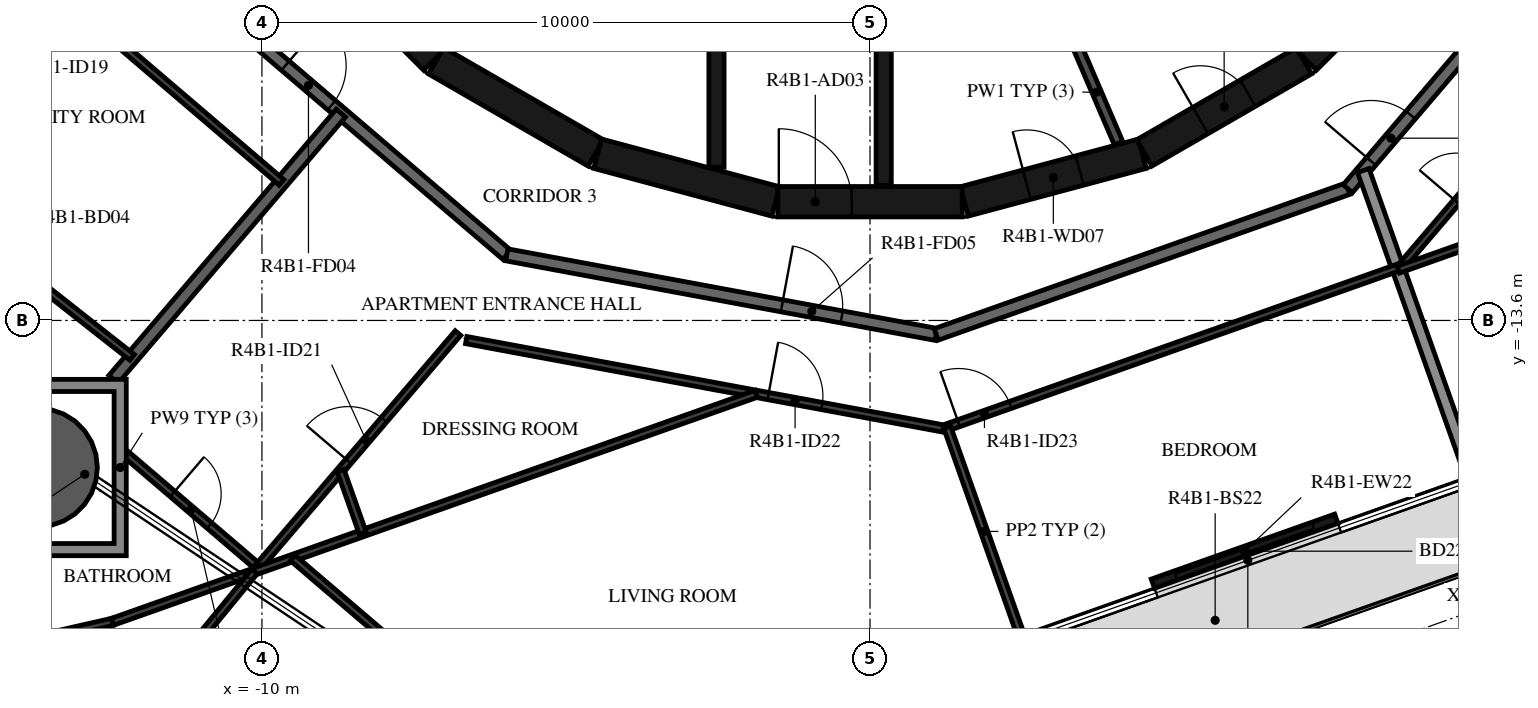
"""IFC4 building model, lengths in metres.
Left out: names, types, materials, properties, quantities, classifications, styles, units other than length and angle.
Written with IfcOpenShell. Run it as: python <this file> out.ifc"""

import sys

from ifc_helpers import new_model, si_unit, direction, frame, frame_2d, origin, origin_2d, place, context, subcontext, project, spatial, polyline, rectangle, hollow_circle, outline, extrude, element, fill, save


model = new_model("IFC4")
c1 = context("Model", 3, precision=1e-05, world=origin(), true_north=direction((0.0, 1.0)))
c2 = subcontext(c1, "Body", "Model", "MODEL_VIEW")
j1 = project(units=[si_unit("LENGTHUNIT", "METRE"), si_unit("PLANEANGLEUNIT", "RADIAN")], contexts=[c1])
p1 = place(None, origin())
s1 = spatial("IfcSite", under=j1, at=p1, CompositionType="ELEMENT")
p2 = place(p1, origin())
s2 = spatial("IfcBuilding", under=s1, at=p2, CompositionType="ELEMENT")
p3 = place(p2, frame((0.0, 0.0, 162.2)))
s3 = spatial("IfcBuildingStorey", under=s2, at=p3, CompositionType="ELEMENT", Elevation=162.2)
p4 = place(p3, frame((-13.681, -16.019, -0.38), z_axis=(0.0, 0.0, 1.0), x_axis=(1.0, 0.0, 0.0)))
e1 = element("IfcColumn", 1, at=p4, inside=s3, PredefinedType="COLUMN", context=c2, shape_type="SweptSolid", body=[
    extrude(hollow_circle(Radius=0.975, WallThickness=0.045, at=origin_2d()), origin(), (0.0, 0.0, 1.0), 3.5),
])
p5 = place(p3, frame((4.652, -17.929, 0.0), z_axis=(0.0, 0.0, 1.0), x_axis=(0.942620722428, 0.333865502335, 0.0)))
e2 = element("IfcWall", 2, at=p5, inside=s3, PredefinedType="STANDARD", context=c2, shape_type="SweptSolid", body=[
    extrude(rectangle(XDim=3.2, YDim=0.16, at=frame_2d((1.6, 0.0))), origin(), (0.0, 0.0, 1.0), 3.12),
])
p6 = place(p5, frame((0.4, 0.0, 0.0)))
e3 = element("IfcOpeningElement", 3, at=p6, cuts=e2, PredefinedType="OPENING", context=c2, shape_type="SweptSolid", body=[
    extrude(rectangle(XDim=2.4, YDim=2.4, at=frame_2d((1.2, 1.2))), frame((0.0, 0.09, 0.0), z_axis=(0.0, -1.0, 0.0), x_axis=(1.0, 0.0, 0.0)), (0.0, 0.0, 1.0), 0.18),
])
p7 = place(p3, frame((1.55, -11.643, 0.0), z_axis=(0.0, 0.0, 1.0), x_axis=(0.965948410781, 0.258734743916, 0.0)))
e4 = element("IfcWall", 4, at=p7, inside=s3, PredefinedType="SHEAR", context=c2, shape_type="SweptSolid", body=[
    extrude(rectangle(XDim=3.033, YDim=0.5, at=frame_2d((1.516, 0.0))), origin(), (0.0, 0.0, 1.0), 3.12),
])
p8 = place(p7, frame((1.066, 0.0, 0.0)))
e5 = element("IfcOpeningElement", 5, at=p8, cuts=e4, PredefinedType="OPENING", context=c2, shape_type="SweptSolid", body=[
    extrude(rectangle(XDim=0.9, YDim=2.1, at=frame_2d((0.45, 1.05))), frame((0.0, 0.26, 0.0), z_axis=(0.0, -1.0, 0.0), x_axis=(1.0, 0.0, 0.0)), (0.0, 0.0, 1.0), 0.52),
])
p9 = place(p3, frame((4.51, -10.845, 0.0), z_axis=(0.0, 0.0, 1.0), x_axis=(0.865975092491, 0.500087131594, 0.0)))
e6 = element("IfcWall", 6, at=p9, inside=s3, PredefinedType="SHEAR", context=c2, shape_type="SweptSolid", body=[
    extrude(rectangle(XDim=3.033, YDim=0.5, at=frame_2d((1.516, 0.0))), origin(), (0.0, 0.0, 1.0), 3.12),
])
p10 = place(p9, frame((1.066, 0.0, 0.0)))
e7 = element("IfcOpeningElement", 7, at=p10, cuts=e6, PredefinedType="OPENING", context=c2, shape_type="SweptSolid", body=[
    extrude(rectangle(XDim=0.9, YDim=2.1, at=frame_2d((0.45, 1.05))), frame((0.0, 0.26, 0.0), z_axis=(0.0, -1.0, 0.0), x_axis=(1.0, 0.0, 0.0)), (0.0, 0.0, 1.0), 0.52),
])
p11 = place(p3, frame((7.164, -9.308, 0.0), z_axis=(0.0, 0.0, 1.0), x_axis=(0.707106781187, 0.707106781187, 0.0)))
e8 = element("IfcWall", 8, at=p11, inside=s3, PredefinedType="SHEAR", context=c2, shape_type="SweptSolid", body=[
    extrude(rectangle(XDim=3.032, YDim=0.5, at=frame_2d((1.516, 0.0))), origin(), (0.0, 0.0, 1.0), 3.12),
])
p12 = place(p11, frame((1.566, 0.0, 0.0)))
e9 = element("IfcOpeningElement", 9, at=p12, cuts=e8, PredefinedType="OPENING", context=c2, shape_type="SweptSolid", body=[
    extrude(rectangle(XDim=0.9, YDim=2.1, at=frame_2d((0.45, 1.05))), frame((0.0, 0.26, 0.0), z_axis=(0.0, -1.0, 0.0), x_axis=(1.0, 0.0, 0.0)), (0.0, 0.0, 1.0), 0.52),
])
p13 = place(p3, frame((-9.308, -7.164, 0.0), z_axis=(0.0, 0.0, 1.0), x_axis=(0.707106781187, -0.707106781187, 0.0)))
e10 = element("IfcWall", 10, at=p13, inside=s3, PredefinedType="SHEAR", context=c2, shape_type="SweptSolid", body=[
    extrude(rectangle(XDim=3.032, YDim=0.5, at=frame_2d((1.516, 0.0))), origin(), (0.0, 0.0, 1.0), 3.12),
])
for number, where, z_axis, x_axis in (
    (11, (-7.137, -9.329, 0.0), (0.0, 0.0, 1.0), (0.866, -0.5, 0.0)),
    (12, (-4.479, -10.858, 0.0), (0.0, 0.0, 1.0), (0.966, -0.259, 0.0)),
):
    element("IfcWall", number, at=place(p3, frame(where, z_axis=z_axis, x_axis=x_axis)), inside=s3, PredefinedType="SHEAR", context=c2, shape_type="SweptSolid", body=[
        extrude(rectangle(XDim=3.033, YDim=0.5, at=frame_2d((1.516, 0.0))), origin(), (0.0, 0.0, 1.0), 3.12),
    ])
p14 = place(p3, frame((-1.516, -11.647, 0.0), z_axis=(0.0, 0.0, 1.0), x_axis=(1.0, 0.0, 0.0)))
e13 = element("IfcWall", 13, at=p14, inside=s3, PredefinedType="SHEAR", context=c2, shape_type="SweptSolid", body=[
    extrude(rectangle(XDim=3.033, YDim=0.5, at=frame_2d((1.516, 0.0))), origin(), (0.0, 0.0, 1.0), 3.12),
])
p15 = place(p14, frame((0.016, 0.0, 0.0)))
e14 = element("IfcOpeningElement", 14, at=p15, cuts=e13, PredefinedType="OPENING", context=c2, shape_type="SweptSolid", body=[
    extrude(rectangle(XDim=1.2, YDim=2.1, at=frame_2d((0.6, 1.05))), frame((0.0, 0.26, 0.0), z_axis=(0.0, -1.0, 0.0), x_axis=(1.0, 0.0, 0.0)), (0.0, 0.0, 1.0), 0.52),
])
p16 = place(p3, frame((-2.525, -8.97, 0.0), z_axis=(0.0, 0.0, 1.0), x_axis=(0.0, -1.0, 0.0)))
e15 = element("IfcWall", 15, at=p16, inside=s3, PredefinedType="SHEAR", context=c2, shape_type="SweptSolid", body=[
    extrude(rectangle(XDim=2.11, YDim=0.25, at=frame_2d((1.055, 0.0))), origin(), (0.0, 0.0, 1.0), 3.12),
])
p17 = place(p3, frame((0.225, -8.97, 0.0), z_axis=(0.0, 0.0, 1.0), x_axis=(0.0, -1.0, 0.0)))
e16 = element("IfcWall", 16, at=p17, inside=s3, PredefinedType="SHEAR", context=c2, shape_type="SweptSolid", body=[
    extrude(rectangle(XDim=2.41, YDim=0.25, at=frame_2d((1.205, 0.0))), origin(), (0.0, 0.0, 1.0), 3.12),
])
p18 = place(p3, frame((3.367, -9.007, 0.0), z_axis=(0.0, 0.0, 1.0), x_axis=(0.394387482265, -0.918944238696, 0.0)))
e17 = element("IfcWall", 17, at=p18, inside=s3, PredefinedType="PARTITIONING", context=c2, shape_type="SweptSolid", body=[
    extrude(rectangle(XDim=1.825, YDim=0.15, at=frame_2d((0.913, 0.0))), origin(), (0.0, 0.0, 1.0), 3.12),
])
p19 = place(p3, frame((-11.433, -7.858, 0.0), z_axis=(0.0, 0.0, 1.0), x_axis=(0.760412154545, -0.649440801937, 0.0)))
e18 = element("IfcWall", 18, at=p19, inside=s3, PredefinedType="STANDARD", context=c2, shape_type="SweptSolid", body=[
    extrude(rectangle(XDim=7.181, YDim=0.2, at=frame_2d((3.59, 0.0))), origin(), (0.0, 0.0, 1.0), 3.12),
])
p20 = place(p19, frame((2.39, 0.0, 0.0)))
e19 = element("IfcOpeningElement", 19, at=p20, cuts=e18, PredefinedType="OPENING", context=c2, shape_type="SweptSolid", body=[
    extrude(rectangle(XDim=1.0, YDim=2.1, at=frame_2d((0.5, 1.05))), frame((0.0, 0.11, 0.0), z_axis=(0.0, -1.0, 0.0), x_axis=(1.0, 0.0, 0.0)), (0.0, 0.0, 1.0), 0.22),
])
p21 = place(p3, frame((-5.972, -12.521, 0.0), z_axis=(0.0, 0.0, 1.0), x_axis=(0.983256068163, -0.18222926335, 0.0)))
e20 = element("IfcWall", 20, at=p21, inside=s3, PredefinedType="STANDARD", context=c2, shape_type="SweptSolid", body=[
    extrude(rectangle(XDim=7.181, YDim=0.2, at=frame_2d((3.59, 0.0))), origin(), (0.0, 0.0, 1.0), 3.12),
])
p22 = place(p21, frame((4.6, 0.0, 0.0)))
e21 = element("IfcOpeningElement", 21, at=p22, cuts=e20, PredefinedType="OPENING", context=c2, shape_type="SweptSolid", body=[
    extrude(rectangle(XDim=1.0, YDim=2.1, at=frame_2d((0.5, 1.05))), frame((0.0, 0.11, 0.0), z_axis=(0.0, -1.0, 0.0), x_axis=(1.0, 0.0, 0.0)), (0.0, 0.0, 1.0), 0.22),
])
p23 = place(p3, frame((1.088, -13.83, 0.0), z_axis=(0.0, 0.0, 1.0), x_axis=(0.942648397945, 0.333787354241, 0.0)))
e22 = element("IfcWall", 22, at=p23, inside=s3, PredefinedType="STANDARD", context=c2, shape_type="SweptSolid", body=[
    extrude(rectangle(XDim=7.181, YDim=0.2, at=frame_2d((3.591, 0.0))), origin(), (0.0, 0.0, 1.0), 3.12),
])
p24 = place(p3, frame((7.858, -11.433, 0.0), z_axis=(0.0, 0.0, 1.0), x_axis=(0.649440801937, 0.760412154545, 0.0)))
e23 = element("IfcWall", 23, at=p24, inside=s3, PredefinedType="STANDARD", context=c2, shape_type="SweptSolid", body=[
    extrude(rectangle(XDim=7.181, YDim=0.2, at=frame_2d((3.59, 0.0))), origin(), (0.0, 0.0, 1.0), 3.12),
])
p25 = place(p24, frame((0.592, 0.0, 0.0)))
e24 = element("IfcOpeningElement", 24, at=p25, cuts=e23, PredefinedType="OPENING", context=c2, shape_type="SweptSolid", body=[
    extrude(rectangle(XDim=1.0, YDim=2.1, at=frame_2d((0.5, 1.05))), frame((0.0, 0.11, 0.0), z_axis=(0.0, -1.0, 0.0), x_axis=(1.0, 0.0, 0.0)), (0.0, 0.0, 1.0), 0.22),
])
p26 = place(p3, frame((-12.441, -14.569, 0.0), z_axis=(0.0, 0.0, 1.0), x_axis=(0.649446013128, 0.760407703822, 0.0)))
e25 = element("IfcWall", 25, at=p26, inside=s3, PredefinedType="STANDARD", context=c2, shape_type="SweptSolid", body=[
    extrude(rectangle(XDim=5.758, YDim=0.2, at=frame_2d((2.879, 0.0))), origin(), (0.0, 0.0, 1.0), 3.12),
])
p27 = place(p3, frame((9.891, -16.158, 0.0), z_axis=(0.0, 0.0, 1.0), x_axis=(-0.333807281402, 0.942641341594, 0.0)))
e26 = element("IfcWall", 26, at=p27, inside=s3, PredefinedType="STANDARD", context=c2, shape_type="SweptSolid", body=[
    extrude(rectangle(XDim=5.329, YDim=0.2, at=frame_2d((2.665, 0.0))), origin(), (0.0, 0.0, 1.0), 2.73),
])
p28 = place(p3, frame((-12.713, -8.737, 0.0), z_axis=(0.0, 0.0, 1.0), x_axis=(0.760420863476, -0.649430604754, 0.0)))
e27 = element("IfcWall", 27, at=p28, inside=s3, PredefinedType="PARTITIONING", context=c2, shape_type="SweptSolid", body=[
    extrude(rectangle(XDim=3.992, YDim=0.12, at=frame_2d((1.996, 0.0))), origin(), (0.0, 0.0, 1.0), 3.12),
])
p29 = place(p3, frame((-15.677, -11.42, 0.0), z_axis=(0.0, 0.0, 1.0), x_axis=(0.785821888461, -0.618452875824, 0.0)))
e28 = element("IfcWall", 28, at=p29, inside=s3, PredefinedType="PARTITIONING", context=c2, shape_type="SweptSolid", body=[
    extrude(rectangle(XDim=4.507, YDim=0.12, at=frame_2d((2.254, 0.0))), origin(), (0.0, 0.0, 1.0), 3.12),
])
p30 = place(p29, frame((0.4, 0.0, 0.0)))
e29 = element("IfcOpeningElement", 29, at=p30, cuts=e28, PredefinedType="OPENING", context=c2, shape_type="SweptSolid", body=[
    extrude(rectangle(XDim=0.8, YDim=2.1, at=frame_2d((0.4, 1.05))), frame((0.0, 0.07, 0.0), z_axis=(0.0, -1.0, 0.0), x_axis=(1.0, 0.0, 0.0)), (0.0, 0.0, 1.0), 0.14),
])
p31 = place(p3, frame((-12.231, -15.804, 0.0), z_axis=(0.0, 0.0, 1.0), x_axis=(0.760403625387, -0.649450788357, 0.0)))
e30 = element("IfcWall", 30, at=p31, inside=s3, PredefinedType="PARTITIONING", context=c2, shape_type="SweptSolid", body=[
    extrude(rectangle(XDim=2.852, YDim=0.12, at=frame_2d((1.426, 0.0))), origin(), (0.0, 0.0, 1.0), 3.12),
])
p32 = place(p31, frame((1.0, 0.0, 0.0)))
e31 = element("IfcOpeningElement", 31, at=p32, cuts=e30, PredefinedType="OPENING", context=c2, shape_type="SweptSolid", body=[
    extrude(rectangle(XDim=0.8, YDim=2.1, at=frame_2d((0.4, 1.05))), frame((0.0, 0.07, 0.0), z_axis=(0.0, -1.0, 0.0), x_axis=(1.0, 0.0, 0.0)), (0.0, 0.0, 1.0), 0.14),
])
p33 = place(p3, frame((-10.063, -17.656, 0.0), z_axis=(0.0, 0.0, 1.0), x_axis=(0.649451567172, 0.760402960211, 0.0)))
e32 = element("IfcWall", 32, at=p33, inside=s3, PredefinedType="PARTITIONING", context=c2, shape_type="SweptSolid", body=[
    extrude(rectangle(XDim=5.061, YDim=0.12, at=frame_2d((2.531, 0.0))), origin(), (0.0, 0.0, 1.0), 3.12),
])
p34 = place(p33, frame((2.288, 0.0, 0.0)))
e33 = element("IfcOpeningElement", 33, at=p34, cuts=e32, PredefinedType="OPENING", context=c2, shape_type="SweptSolid", body=[
    extrude(rectangle(XDim=0.9, YDim=2.1, at=frame_2d((0.45, 1.05))), frame((0.0, 0.07, 0.0), z_axis=(0.0, -1.0, 0.0), x_axis=(1.0, 0.0, 0.0)), (0.0, 0.0, 1.0), 0.14),
])
p35 = place(p3, frame((-6.641, -13.923, 0.0), z_axis=(0.0, 0.0, 1.0), x_axis=(0.983250157272, -0.182261153912, 0.0)))
e34 = element("IfcWall", 34, at=p35, inside=s3, PredefinedType="PARTITIONING", context=c2, shape_type="SweptSolid", body=[
    extrude(rectangle(XDim=7.985, YDim=0.12, at=frame_2d((3.992, 0.0))), origin(), (0.0, 0.0, 1.0), 3.12),
])
p36 = place(p35, frame((5.051, 0.0, 0.0)))
e35 = element("IfcOpeningElement", 35, at=p36, cuts=e34, PredefinedType="OPENING", context=c2, shape_type="SweptSolid", body=[
    extrude(rectangle(XDim=0.9, YDim=2.1, at=frame_2d((0.45, 1.05))), frame((0.0, 0.07, 0.0), z_axis=(0.0, -1.0, 0.0), x_axis=(1.0, 0.0, 0.0)), (0.0, 0.0, 1.0), 0.14),
])
p37 = place(p3, frame((1.269, -15.357, 0.0), z_axis=(0.0, 0.0, 1.0), x_axis=(0.942639442898, 0.333812643101, 0.0)))
e36 = element("IfcWall", 36, at=p37, inside=s3, PredefinedType="PARTITIONING", context=c2, shape_type="SweptSolid", body=[
    extrude(rectangle(XDim=7.86, YDim=0.12, at=frame_2d((3.93, 0.0))), origin(), (0.0, 0.0, 1.0), 3.12),
])
p38 = place(p37, frame((0.2, 0.0, 0.0)))
e37 = element("IfcOpeningElement", 37, at=p38, cuts=e36, PredefinedType="OPENING", context=c2, shape_type="SweptSolid", body=[
    extrude(rectangle(XDim=0.9, YDim=2.1, at=frame_2d((0.45, 1.05))), frame((0.0, 0.07, 0.0), z_axis=(0.0, -1.0, 0.0), x_axis=(1.0, 0.0, 0.0)), (0.0, 0.0, 1.0), 0.14),
])
p39 = place(p3, frame((-1.871, -14.807, 0.0), z_axis=(0.0, 0.0, 1.0), x_axis=(-0.942640759962, -0.333808923874, 0.0)))
e38 = element("IfcWall", 38, at=p39, inside=s3, PredefinedType="PARTITIONING", context=c2, shape_type="SweptSolid", body=[
    extrude(rectangle(XDim=11.234, YDim=0.12, at=frame_2d((5.617, 0.0))), origin(), (0.0, 0.0, 1.0), 3.12),
])
p40 = place(p3, frame((-12.461, -18.557, 0.0), z_axis=(0.0, 0.0, 1.0), x_axis=(-0.975039040601, -0.222033486897, 0.0)))
e39 = element("IfcWall", 39, at=p40, inside=s3, PredefinedType="PARTITIONING", context=c2, shape_type="SweptSolid", body=[
    extrude(rectangle(XDim=0.947, YDim=0.12, at=frame_2d((0.473, 0.0))), origin(), (0.0, 0.0, 1.0), 3.12),
])
p41 = place(p3, frame((-15.146, -23.841, 0.0), z_axis=(0.0, 0.0, 1.0), x_axis=(0.634970373647, 0.772536487547, 0.0)))
e40 = element("IfcWall", 40, at=p41, inside=s3, PredefinedType="PARTITIONING", context=c2, shape_type="SweptSolid", body=[
    extrude(rectangle(XDim=7.912, YDim=0.12, at=frame_2d((3.956, 0.0))), origin(), (0.0, 0.0, 1.0), 3.12),
])
p42 = place(p41, frame((0.5, 0.0, 0.0)))
e41 = element("IfcOpeningElement", 41, at=p42, cuts=e40, PredefinedType="OPENING", context=c2, shape_type="SweptSolid", body=[
    extrude(rectangle(XDim=0.9, YDim=2.1, at=frame_2d((0.45, 1.05))), frame((0.0, 0.07, 0.0), z_axis=(0.0, -1.0, 0.0), x_axis=(1.0, 0.0, 0.0)), (0.0, 0.0, 1.0), 0.14),
])
p43 = place(p3, frame((-8.342, -17.098, 0.0), z_axis=(0.0, 0.0, 1.0), x_axis=(-0.333801646268, 0.942643337084, 0.0)))
e42 = element("IfcWall", 42, at=p43, inside=s3, PredefinedType="PARTITIONING", context=c2, shape_type="SweptSolid", body=[
    extrude(rectangle(XDim=1.093, YDim=0.12, at=frame_2d((0.546, 0.0))), origin(), (0.0, 0.0, 1.0), 3.12),
])
p44 = place(p3, frame((-4.927, -21.406, 0.0), z_axis=(0.0, 0.0, 1.0), x_axis=(-0.760409236665, 0.649444218385, 0.0)))
e43 = element("IfcWall", 43, at=p44, inside=s3, PredefinedType="PARTITIONING", context=c2, shape_type="SweptSolid", body=[
    extrude(rectangle(XDim=6.004, YDim=0.12, at=frame_2d((3.002, 0.0))), origin(), (0.0, 0.0, 1.0), 3.12),
])
p45 = place(p44, frame((0.4, 0.0, 0.0)))
e44 = element("IfcOpeningElement", 44, at=p45, cuts=e43, PredefinedType="OPENING", context=c2, shape_type="SweptSolid", body=[
    extrude(rectangle(XDim=0.9, YDim=2.1, at=frame_2d((0.45, 1.05))), frame((0.0, 0.07, 0.0), z_axis=(0.0, -1.0, 0.0), x_axis=(1.0, 0.0, 0.0)), (0.0, 0.0, 1.0), 0.14),
])
p46 = place(p3, frame((2.482, -18.782, 0.0), z_axis=(0.0, 0.0, 1.0), x_axis=(-0.33379364943, 0.942646168825, 0.0)))
e45 = element("IfcWall", 45, at=p46, inside=s3, PredefinedType="PARTITIONING", context=c2, shape_type="SweptSolid", body=[
    extrude(rectangle(XDim=3.633, YDim=0.12, at=frame_2d((1.816, 0.0))), origin(), (0.0, 0.0, 1.0), 2.73),
])
p47 = place(p3, frame((8.737, -12.713, 0.0), z_axis=(0.0, 0.0, 1.0), x_axis=(0.649430604754, 0.760420863476, 0.0)))
e46 = element("IfcWall", 46, at=p47, inside=s3, PredefinedType="PARTITIONING", context=c2, shape_type="SweptSolid", body=[
    extrude(rectangle(XDim=7.985, YDim=0.12, at=frame_2d((3.992, 0.0))), origin(), (0.0, 0.0, 1.0), 3.12),
])
p48 = place(p47, frame((1.4, 0.0, 0.0)))
e47 = element("IfcOpeningElement", 47, at=p48, cuts=e46, PredefinedType="OPENING", context=c2, shape_type="SweptSolid", body=[
    extrude(rectangle(XDim=0.8, YDim=2.1, at=frame_2d((0.4, 1.05))), frame((0.0, 0.07, 0.0), z_axis=(0.0, -1.0, 0.0), x_axis=(1.0, 0.0, 0.0)), (0.0, 0.0, 1.0), 0.14),
])
p49 = place(p3, frame((14.183, -10.819, 0.0), z_axis=(0.0, 0.0, 1.0), x_axis=(-0.942646448855, -0.333792858612, 0.0)))
e48 = element("IfcWall", 48, at=p49, inside=s3, PredefinedType="PARTITIONING", context=c2, shape_type="SweptSolid", body=[
    extrude(rectangle(XDim=5.828, YDim=0.12, at=frame_2d((2.914, 0.0))), origin(), (0.0, 0.0, 1.0), 3.12),
])
p50 = place(p3, origin())
e49 = element("IfcWall", 49, at=p50, inside=s3, PredefinedType="STANDARD", context=c2, shape_type="SweptSolid", body=[
    extrude(outline(polyline([(-12.231, -14.569), (-12.231, -17.469), (-15.131, -17.469), (-15.131, -14.569), (-12.231, -14.569)]), holes=[polyline([(-14.931, -17.269), (-12.431, -17.269), (-12.431, -14.769), (-14.931, -14.769), (-14.931, -17.269)])]), origin(), (0.0, 0.0, 1.0), 3.12),
])
p51 = place(p6, origin())
e50 = element("IfcDoor", 50, at=p51, inside=s3, OperationType="DOUBLE_DOOR_SLIDING", PredefinedType="DOOR", context=c2, shape_type="SweptSolid", body=[
    extrude(rectangle(XDim=2.4, YDim=2.4, at=frame_2d((1.2, 1.2))), frame((0.0, 0.025, 0.0), z_axis=(0.0, -1.0, 0.0), x_axis=(1.0, 0.0, 0.0)), (0.0, 0.0, 1.0), 0.05),
])
fill(e3, e50)
p52 = place(p15, origin())
e51 = element("IfcDoor", 51, at=p52, inside=s3, OperationType="SINGLE_SWING_RIGHT", PredefinedType="DOOR", context=c2, shape_type="SweptSolid", body=[
    extrude(rectangle(XDim=1.2, YDim=2.1, at=frame_2d((0.6, 1.05))), frame((0.0, 0.025, 0.0), z_axis=(0.0, -1.0, 0.0), x_axis=(1.0, 0.0, 0.0)), (0.0, 0.0, 1.0), 0.05),
])
fill(e14, e51)
p53 = place(p8, origin())
e52 = element("IfcDoor", 52, at=p53, inside=s3, OperationType="SINGLE_SWING_LEFT", PredefinedType="DOOR", context=c2, shape_type="SweptSolid", body=[
    extrude(rectangle(XDim=0.9, YDim=2.1, at=frame_2d((0.45, 1.05))), frame((0.0, 0.025, 0.0), z_axis=(0.0, -1.0, 0.0), x_axis=(1.0, 0.0, 0.0)), (0.0, 0.0, 1.0), 0.05),
])
fill(e5, e52)
p54 = place(p10, origin())
e53 = element("IfcDoor", 53, at=p54, inside=s3, OperationType="SINGLE_SWING_RIGHT", PredefinedType="DOOR", context=c2, shape_type="SweptSolid", body=[
    extrude(rectangle(XDim=0.9, YDim=2.1, at=frame_2d((0.45, 1.05))), frame((0.0, 0.025, 0.0), z_axis=(0.0, -1.0, 0.0), x_axis=(1.0, 0.0, 0.0)), (0.0, 0.0, 1.0), 0.05),
])
fill(e7, e53)
p55 = place(p20, origin())
e54 = element("IfcDoor", 54, at=p55, inside=s3, OperationType="SINGLE_SWING_RIGHT", PredefinedType="DOOR", context=c2, shape_type="SweptSolid", body=[
    extrude(rectangle(XDim=1.0, YDim=2.1, at=frame_2d((0.5, 1.05))), frame((0.0, 0.025, 0.0), z_axis=(0.0, -1.0, 0.0), x_axis=(1.0, 0.0, 0.0)), (0.0, 0.0, 1.0), 0.05),
])
fill(e19, e54)
p56 = place(p22, origin())
e55 = element("IfcDoor", 55, at=p56, inside=s3, OperationType="SINGLE_SWING_LEFT", PredefinedType="DOOR", context=c2, shape_type="SweptSolid", body=[
    extrude(rectangle(XDim=1.0, YDim=2.1, at=frame_2d((0.5, 1.05))), frame((0.0, 0.025, 0.0), z_axis=(0.0, -1.0, 0.0), x_axis=(1.0, 0.0, 0.0)), (0.0, 0.0, 1.0), 0.05),
])
fill(e21, e55)
p57 = place(p32, origin())
e56 = element("IfcDoor", 56, at=p57, inside=s3, OperationType="SINGLE_SWING_LEFT", PredefinedType="DOOR", context=c2, shape_type="SweptSolid", body=[
    extrude(rectangle(XDim=0.8, YDim=2.1, at=frame_2d((0.4, 1.05))), frame((0.0, 0.025, 0.0), z_axis=(0.0, -1.0, 0.0), x_axis=(1.0, 0.0, 0.0)), (0.0, 0.0, 1.0), 0.05),
])
fill(e31, e56)
p58 = place(p34, origin())
e57 = element("IfcDoor", 57, at=p58, inside=s3, OperationType="SINGLE_SWING_LEFT", PredefinedType="DOOR", context=c2, shape_type="SweptSolid", body=[
    extrude(rectangle(XDim=0.9, YDim=2.1, at=frame_2d((0.45, 1.05))), frame((0.0, 0.025, 0.0), z_axis=(0.0, -1.0, 0.0), x_axis=(1.0, 0.0, 0.0)), (0.0, 0.0, 1.0), 0.05),
])
fill(e33, e57)
p59 = place(p36, origin())
e58 = element("IfcDoor", 58, at=p59, inside=s3, OperationType="SINGLE_SWING_LEFT", PredefinedType="DOOR", context=c2, shape_type="SweptSolid", body=[
    extrude(rectangle(XDim=0.9, YDim=2.1, at=frame_2d((0.45, 1.05))), frame((0.0, 0.025, 0.0), z_axis=(0.0, -1.0, 0.0), x_axis=(1.0, 0.0, 0.0)), (0.0, 0.0, 1.0), 0.05),
])
fill(e35, e58)
p60 = place(p38, origin())
e59 = element("IfcDoor", 59, at=p60, inside=s3, OperationType="SINGLE_SWING_LEFT", PredefinedType="DOOR", context=c2, shape_type="SweptSolid", body=[
    extrude(rectangle(XDim=0.9, YDim=2.1, at=frame_2d((0.45, 1.05))), frame((0.0, 0.025, 0.0), z_axis=(0.0, -1.0, 0.0), x_axis=(1.0, 0.0, 0.0)), (0.0, 0.0, 1.0), 0.05),
])
fill(e37, e59)
p61 = place(p25, origin())
e60 = element("IfcDoor", 60, at=p61, inside=s3, OperationType="SINGLE_SWING_RIGHT", PredefinedType="DOOR", context=c2, shape_type="SweptSolid", body=[
    extrude(rectangle(XDim=1.0, YDim=2.1, at=frame_2d((0.5, 1.05))), frame((0.0, 0.025, 0.0), z_axis=(0.0, -1.0, 0.0), x_axis=(1.0, 0.0, 0.0)), (0.0, 0.0, 1.0), 0.05),
])
fill(e24, e60)
p62 = place(p48, origin())
e61 = element("IfcDoor", 61, at=p62, inside=s3, OperationType="SINGLE_SWING_RIGHT", PredefinedType="DOOR", context=c2, shape_type="SweptSolid", body=[
    extrude(rectangle(XDim=0.8, YDim=2.1, at=frame_2d((0.4, 1.05))), frame((0.0, 0.025, 0.0), z_axis=(0.0, -1.0, 0.0), x_axis=(1.0, 0.0, 0.0)), (0.0, 0.0, 1.0), 0.05),
])
fill(e47, e61)
save(model, sys.argv[1])
